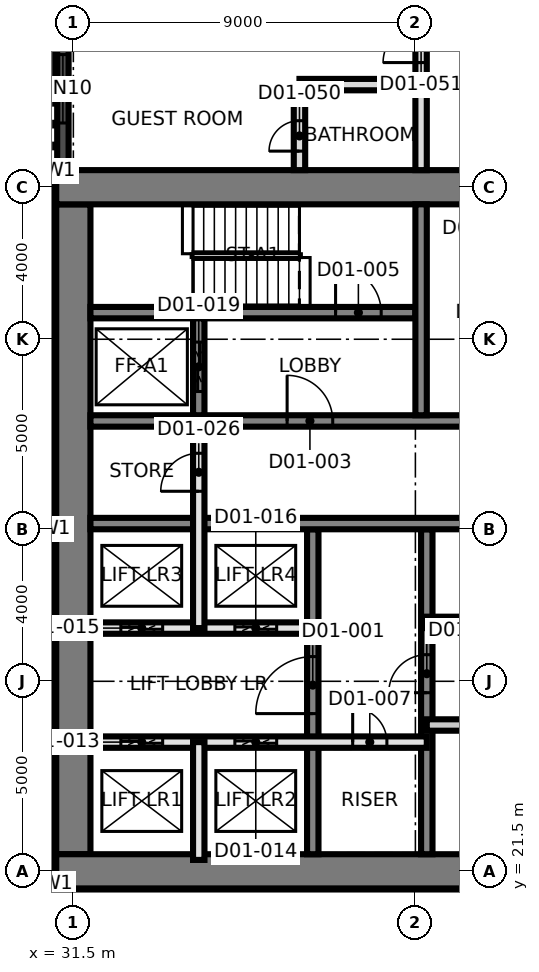
"""IFC4 building model, lengths in metres.
Left out: names, types, materials, properties, quantities, classifications, styles, units other than length and angle.
Written with IfcOpenShell. Run it as: python <this file> out.ifc"""

import sys

from ifc_helpers import new_model, si_unit, direction, frame, frame_2d, origin, place, context, subcontext, project, spatial, rectangle, extrude, element, fill, save


model = new_model("IFC4")
c1 = context("Model", 3, precision=1e-05, world=origin(), true_north=direction((0.0, 1.0)))
c2 = subcontext(c1, "Body", "Model", "MODEL_VIEW")
j1 = project(units=[si_unit("LENGTHUNIT", "METRE"), si_unit("PLANEANGLEUNIT", "RADIAN")], contexts=[c1])
p1 = place(None, origin())
s1 = spatial("IfcSite", under=j1, at=p1, CompositionType="ELEMENT")
p2 = place(p1, origin())
s2 = spatial("IfcBuilding", under=s1, at=p2, CompositionType="ELEMENT")
p3 = place(p2, frame((0.0, 0.0, 33.5)))
s3 = spatial("IfcBuildingStorey", under=s2, at=p3, CompositionType="ELEMENT", Elevation=33.5)
p4 = place(p3, frame((31.5, 21.95, 0.0), z_axis=(0.0, 0.0, 1.0), x_axis=(0.0, 1.0, 0.0)))
e1 = element("IfcWall", 1, at=p4, inside=s3, PredefinedType="SHEAR", context=c2, shape_type="SweptSolid", body=[
    extrude(rectangle(XDim=17.1, YDim=0.9, at=frame_2d((8.55, 0.0))), origin(), (0.0, 0.0, 1.0), 3.7),
])
p5 = place(p3, frame((31.05, 21.5, 0.0), z_axis=(0.0, 0.0, 1.0), x_axis=(1.0, 0.0, 0.0)))
e2 = element("IfcWall", 2, at=p5, inside=s3, PredefinedType="SHEAR", context=c2, shape_type="SweptSolid", body=[
    extrude(rectangle(XDim=27.0, YDim=0.9, at=frame_2d((13.5, 0.0))), origin(), (0.0, 0.0, 1.0), 3.7),
])
p6 = place(p3, frame((31.05, 39.5, 0.0), z_axis=(0.0, 0.0, 1.0), x_axis=(1.0, 0.0, 0.0)))
e3 = element("IfcWall", 3, at=p6, inside=s3, PredefinedType="SHEAR", context=c2, shape_type="SweptSolid", body=[
    extrude(rectangle(XDim=27.0, YDim=0.9, at=frame_2d((13.5, 0.0))), origin(), (0.0, 0.0, 1.0), 3.7),
])
p7 = place(p6, frame((10.65, 0.0, 0.0)))
e4 = element("IfcOpeningElement", 4, at=p7, cuts=e3, PredefinedType="OPENING", context=c2, shape_type="SweptSolid", body=[
    extrude(rectangle(XDim=1.2, YDim=2.1, at=frame_2d((0.6, 1.05))), frame((0.0, 0.46, 0.0), z_axis=(0.0, -1.0, 0.0), x_axis=(1.0, 0.0, 0.0)), (0.0, 0.0, 1.0), 0.92),
])
p8 = place(p3, frame((37.8, 21.95, 0.0), z_axis=(0.0, 0.0, 1.0), x_axis=(0.0, 1.0, 0.0)))
e5 = element("IfcWall", 5, at=p8, inside=s3, PredefinedType="SHEAR", context=c2, shape_type="SweptSolid", body=[
    extrude(rectangle(XDim=8.55, YDim=0.3, at=frame_2d((4.275, 0.0))), origin(), (0.0, 0.0, 1.0), 3.7),
])
p9 = place(p8, frame((3.7, 0.0, 0.0)))
e6 = element("IfcOpeningElement", 6, at=p9, cuts=e5, PredefinedType="OPENING", context=c2, shape_type="SweptSolid", body=[
    extrude(rectangle(XDim=1.5, YDim=2.1, at=frame_2d((0.75, 1.05))), frame((0.0, 0.16, 0.0), z_axis=(0.0, -1.0, 0.0), x_axis=(1.0, 0.0, 0.0)), (0.0, 0.0, 1.0), 0.32),
])
p10 = place(p3, frame((40.8, 21.95, 0.0), z_axis=(0.0, 0.0, 1.0), x_axis=(0.0, 1.0, 0.0)))
e7 = element("IfcWall", 7, at=p10, inside=s3, PredefinedType="SHEAR", context=c2, shape_type="SweptSolid", body=[
    extrude(rectangle(XDim=8.55, YDim=0.3, at=frame_2d((4.275, 0.0))), origin(), (0.0, 0.0, 1.0), 3.7),
])
p11 = place(p10, frame((4.25, 0.0, 0.0)))
e8 = element("IfcOpeningElement", 8, at=p11, cuts=e7, PredefinedType="OPENING", context=c2, shape_type="SweptSolid", body=[
    extrude(rectangle(XDim=1.0, YDim=2.1, at=frame_2d((0.5, 1.05))), frame((0.0, 0.16, 0.0), z_axis=(0.0, -1.0, 0.0), x_axis=(1.0, 0.0, 0.0)), (0.0, 0.0, 1.0), 0.32),
])
p12 = place(p3, frame((31.95, 30.65, 0.0), z_axis=(0.0, 0.0, 1.0), x_axis=(1.0, 0.0, 0.0)))
e9 = element("IfcWall", 9, at=p12, inside=s3, PredefinedType="SHEAR", context=c2, shape_type="SweptSolid", body=[
    extrude(rectangle(XDim=26.1, YDim=0.3, at=frame_2d((13.05, 0.0))), origin(), (0.0, 0.0, 1.0), 3.7),
])
p13 = place(p12, frame((24.55, 0.0, 0.0)))
e10 = element("IfcOpeningElement", 10, at=p13, cuts=e9, PredefinedType="OPENING", context=c2, shape_type="SweptSolid", body=[
    extrude(rectangle(XDim=1.0, YDim=2.1, at=frame_2d((0.5, 1.05))), frame((0.0, 0.16, 0.0), z_axis=(0.0, -1.0, 0.0), x_axis=(1.0, 0.0, 0.0)), (0.0, 0.0, 1.0), 0.32),
])
p14 = place(p12, frame((11.35, 0.0, 0.0)))
e11 = element("IfcOpeningElement", 11, at=p14, cuts=e9, PredefinedType="OPENING", context=c2, shape_type="SweptSolid", body=[
    extrude(rectangle(XDim=1.0, YDim=2.1, at=frame_2d((0.5, 1.05))), frame((0.0, 0.16, 0.0), z_axis=(0.0, -1.0, 0.0), x_axis=(1.0, 0.0, 0.0)), (0.0, 0.0, 1.0), 0.32),
])
p15 = place(p3, frame((31.95, 33.35, 0.0), z_axis=(0.0, 0.0, 1.0), x_axis=(1.0, 0.0, 0.0)))
e12 = element("IfcWall", 12, at=p15, inside=s3, PredefinedType="SHEAR", context=c2, shape_type="SweptSolid", body=[
    extrude(rectangle(XDim=26.1, YDim=0.3, at=frame_2d((13.05, 0.0))), origin(), (0.0, 0.0, 1.0), 3.7),
])
p16 = place(p15, frame((13.7, 0.0, 0.0)))
e13 = element("IfcOpeningElement", 13, at=p16, cuts=e12, PredefinedType="OPENING", context=c2, shape_type="SweptSolid", body=[
    extrude(rectangle(XDim=1.4, YDim=2.1, at=frame_2d((0.7, 1.05))), frame((0.0, 0.16, 0.0), z_axis=(0.0, -1.0, 0.0), x_axis=(1.0, 0.0, 0.0)), (0.0, 0.0, 1.0), 0.32),
])
p17 = place(p15, frame((5.175, 0.0, 0.0)))
e14 = element("IfcOpeningElement", 14, at=p17, cuts=e12, PredefinedType="OPENING", context=c2, shape_type="SweptSolid", body=[
    extrude(rectangle(XDim=1.2, YDim=2.1, at=frame_2d((0.6, 1.05))), frame((0.0, 0.16, 0.0), z_axis=(0.0, -1.0, 0.0), x_axis=(1.0, 0.0, 0.0)), (0.0, 0.0, 1.0), 0.32),
])
p18 = place(p15, frame((19.725, 0.0, 0.0)))
e15 = element("IfcOpeningElement", 15, at=p18, cuts=e12, PredefinedType="OPENING", context=c2, shape_type="SweptSolid", body=[
    extrude(rectangle(XDim=1.2, YDim=2.1, at=frame_2d((0.6, 1.05))), frame((0.0, 0.16, 0.0), z_axis=(0.0, -1.0, 0.0), x_axis=(1.0, 0.0, 0.0)), (0.0, 0.0, 1.0), 0.32),
])
p19 = place(p3, frame((31.95, 36.2, 0.0), z_axis=(0.0, 0.0, 1.0), x_axis=(1.0, 0.0, 0.0)))
e16 = element("IfcWall", 16, at=p19, inside=s3, PredefinedType="SHEAR", context=c2, shape_type="SweptSolid", body=[
    extrude(rectangle(XDim=8.55, YDim=0.3, at=frame_2d((4.275, 0.0))), origin(), (0.0, 0.0, 1.0), 3.7),
])
p20 = place(p19, frame((6.45, 0.0, 0.0)))
e17 = element("IfcOpeningElement", 17, at=p20, cuts=e16, PredefinedType="OPENING", context=c2, shape_type="SweptSolid", body=[
    extrude(rectangle(XDim=1.2, YDim=2.1, at=frame_2d((0.6, 1.05))), frame((0.0, 0.16, 0.0), z_axis=(0.0, -1.0, 0.0), x_axis=(1.0, 0.0, 0.0)), (0.0, 0.0, 1.0), 0.32),
])
p21 = place(p3, frame((40.65, 33.5, 0.0), z_axis=(0.0, 0.0, 1.0), x_axis=(0.0, 1.0, 0.0)))
e18 = element("IfcWall", 18, at=p21, inside=s3, PredefinedType="SHEAR", context=c2, shape_type="SweptSolid", body=[
    extrude(rectangle(XDim=5.55, YDim=0.3, at=frame_2d((2.775, 0.0))), origin(), (0.0, 0.0, 1.0), 3.7),
])
p22 = place(p3, frame((34.8, 33.5, 0.0), z_axis=(0.0, 0.0, 1.0), x_axis=(0.0, 1.0, 0.0)))
e19 = element("IfcWall", 19, at=p22, inside=s3, PredefinedType="SHEAR", context=c2, shape_type="SweptSolid", body=[
    extrude(rectangle(XDim=2.55, YDim=0.3, at=frame_2d((1.275, 0.0))), origin(), (0.0, 0.0, 1.0), 3.7),
])
p23 = place(p22, frame((0.625, 0.0, 0.0)))
e20 = element("IfcOpeningElement", 20, at=p23, cuts=e19, PredefinedType="OPENING", context=c2, shape_type="SweptSolid", body=[
    extrude(rectangle(XDim=1.3, YDim=2.4, at=frame_2d((0.65, 1.2))), frame((0.0, 0.16, 0.0), z_axis=(0.0, -1.0, 0.0), x_axis=(1.0, 0.0, 0.0)), (0.0, 0.0, 1.0), 0.32),
])
p24 = place(p3, frame((31.225, 49.2, 0.0), z_axis=(0.0, 0.0, 1.0), x_axis=(0.0, -1.0, 0.0)))
e21 = element("IfcWall", 21, at=p24, inside=s3, PredefinedType="SOLIDWALL", context=c2, shape_type="SweptSolid", body=[
    extrude(rectangle(XDim=9.02, YDim=0.3, at=frame_2d((4.51, 0.0))), origin(), (0.0, 0.0, 1.0), 3.4),
])
p25 = place(p24, frame((2.35, 0.0, 0.9)))
e22 = element("IfcOpeningElement", 22, at=p25, cuts=e21, PredefinedType="OPENING", context=c2, shape_type="SweptSolid", body=[
    extrude(rectangle(XDim=1.2, YDim=1.5, at=frame_2d((0.6, 0.75))), frame((0.0, 0.16, 0.0), z_axis=(0.0, -1.0, 0.0), x_axis=(1.0, 0.0, 0.0)), (0.0, 0.0, 1.0), 0.32),
])
p26 = place(p24, frame((6.21, 0.0, 0.3)))
e23 = element("IfcOpeningElement", 23, at=p26, cuts=e21, PredefinedType="OPENING", context=c2, shape_type="SweptSolid", body=[
    extrude(rectangle(XDim=1.8, YDim=2.4, at=frame_2d((0.9, 1.2))), frame((0.0, 0.16, 0.0), z_axis=(0.0, -1.0, 0.0), x_axis=(1.0, 0.0, 0.0)), (0.0, 0.0, 1.0), 0.32),
])
p27 = place(p3, frame((30.85, 39.674, 0.0), z_axis=(0.0, 0.0, 1.0), x_axis=(0.0, -1.0, 0.0)))
e24 = element("IfcWall", 24, at=p27, inside=s3, PredefinedType="SOLIDWALL", context=c2, shape_type="SweptSolid", body=[
    extrude(rectangle(XDim=18.314, YDim=0.3, at=frame_2d((9.157, 0.0))), origin(), (0.0, 0.0, 1.0), 3.4),
])
for number, where, z_axis, x_axis in (
    (25, (30.861, 21.302, 0.0), (0.0, 0.0, 1.0), (0.383, -0.924, 0.0)),
    (26, (31.048, 20.967, 0.0), (0.0, 0.0, 1.0), (0.924, -0.383, 0.0)),
):
    element("IfcWall", number, at=place(p3, frame(where, z_axis=z_axis, x_axis=x_axis)), inside=s3, PredefinedType="SOLIDWALL", context=c2, shape_type="SweptSolid", body=[
        extrude(rectangle(XDim=0.275, YDim=0.3, at=frame_2d((0.138, 0.0))), origin(), (0.0, 0.0, 1.0), 3.4),
    ])
p28 = place(p3, frame((31.36, 20.85, 0.0), z_axis=(0.0, 0.0, 1.0), x_axis=(1.0, 0.0, 0.0)))
e27 = element("IfcWall", 27, at=p28, inside=s3, PredefinedType="SOLIDWALL", context=c2, shape_type="SweptSolid", body=[
    extrude(rectangle(XDim=27.281, YDim=0.3, at=frame_2d((13.64, 0.0))), origin(), (0.0, 0.0, 1.0), 3.4),
])
p29 = place(p3, frame((31.8, 24.9, 0.0), z_axis=(0.0, 0.0, 1.0), x_axis=(1.0, 0.0, 0.0)))
e28 = element("IfcWall", 28, at=p29, inside=s3, PredefinedType="SOLIDWALL", context=c2, shape_type="SweptSolid", body=[
    extrude(rectangle(XDim=9.0, YDim=0.3, at=frame_2d((4.5, 0.0))), origin(), (0.0, 0.0, 1.0), 3.4),
])
p30 = place(p29, frame((7.05, 0.0, 0.0)))
e29 = element("IfcOpeningElement", 29, at=p30, cuts=e28, PredefinedType="OPENING", context=c2, shape_type="SweptSolid", body=[
    extrude(rectangle(XDim=0.9, YDim=2.1, at=frame_2d((0.45, 1.05))), frame((0.0, 0.16, 0.0), z_axis=(0.0, -1.0, 0.0), x_axis=(1.0, 0.0, 0.0)), (0.0, 0.0, 1.0), 0.32),
])
p31 = place(p29, frame((0.95, 0.0, 0.0)))
e30 = element("IfcOpeningElement", 30, at=p31, cuts=e28, PredefinedType="OPENING", context=c2, shape_type="SweptSolid", body=[
    extrude(rectangle(XDim=1.1, YDim=2.4, at=frame_2d((0.55, 1.2))), frame((0.0, 0.16, 0.0), z_axis=(0.0, -1.0, 0.0), x_axis=(1.0, 0.0, 0.0)), (0.0, 0.0, 1.0), 0.32),
])
p32 = place(p29, frame((3.95, 0.0, 0.0)))
e31 = element("IfcOpeningElement", 31, at=p32, cuts=e28, PredefinedType="OPENING", context=c2, shape_type="SweptSolid", body=[
    extrude(rectangle(XDim=1.1, YDim=2.4, at=frame_2d((0.55, 1.2))), frame((0.0, 0.16, 0.0), z_axis=(0.0, -1.0, 0.0), x_axis=(1.0, 0.0, 0.0)), (0.0, 0.0, 1.0), 0.32),
])
p33 = place(p3, frame((40.8, 25.35, 0.0), z_axis=(0.0, 0.0, 1.0), x_axis=(1.0, 0.0, 0.0)))
e32 = element("IfcWall", 32, at=p33, inside=s3, PredefinedType="PARTITIONING", context=c2, shape_type="SweptSolid", body=[
    extrude(rectangle(XDim=6.0, YDim=0.3, at=frame_2d((3.0, 0.0))), origin(), (0.0, 0.0, 1.0), 3.4),
])
p34 = place(p33, frame((2.5, 0.0, 0.0)))
e33 = element("IfcOpeningElement", 33, at=p34, cuts=e32, PredefinedType="OPENING", context=c2, shape_type="SweptSolid", body=[
    extrude(rectangle(XDim=1.0, YDim=2.1, at=frame_2d((0.5, 1.05))), frame((0.0, 0.16, 0.0), z_axis=(0.0, -1.0, 0.0), x_axis=(1.0, 0.0, 0.0)), (0.0, 0.0, 1.0), 0.32),
])
p35 = place(p3, frame((31.8, 27.9, 0.0), z_axis=(0.0, 0.0, 1.0), x_axis=(1.0, 0.0, 0.0)))
e34 = element("IfcWall", 34, at=p35, inside=s3, PredefinedType="SOLIDWALL", context=c2, shape_type="SweptSolid", body=[
    extrude(rectangle(XDim=6.0, YDim=0.3, at=frame_2d((3.0, 0.0))), origin(), (0.0, 0.0, 1.0), 3.4),
])
p36 = place(p35, frame((0.95, 0.0, 0.0)))
e35 = element("IfcOpeningElement", 35, at=p36, cuts=e34, PredefinedType="OPENING", context=c2, shape_type="SweptSolid", body=[
    extrude(rectangle(XDim=1.1, YDim=2.4, at=frame_2d((0.55, 1.2))), frame((0.0, 0.16, 0.0), z_axis=(0.0, -1.0, 0.0), x_axis=(1.0, 0.0, 0.0)), (0.0, 0.0, 1.0), 0.32),
])
p37 = place(p35, frame((3.95, 0.0, 0.0)))
e36 = element("IfcOpeningElement", 36, at=p37, cuts=e34, PredefinedType="OPENING", context=c2, shape_type="SweptSolid", body=[
    extrude(rectangle(XDim=1.1, YDim=2.4, at=frame_2d((0.55, 1.2))), frame((0.0, 0.16, 0.0), z_axis=(0.0, -1.0, 0.0), x_axis=(1.0, 0.0, 0.0)), (0.0, 0.0, 1.0), 0.32),
])
p38 = place(p3, frame((40.8, 28.05, 0.0), z_axis=(0.0, 0.0, 1.0), x_axis=(1.0, 0.0, 0.0)))
e37 = element("IfcWall", 37, at=p38, inside=s3, PredefinedType="PARTITIONING", context=c2, shape_type="SweptSolid", body=[
    extrude(rectangle(XDim=6.0, YDim=0.3, at=frame_2d((3.0, 0.0))), origin(), (0.0, 0.0, 1.0), 3.4),
])
p39 = place(p3, frame((34.8, 21.8, 0.0), z_axis=(0.0, 0.0, 1.0), x_axis=(0.0, 1.0, 0.0)))
e38 = element("IfcWall", 38, at=p39, inside=s3, PredefinedType="SOLIDWALL", context=c2, shape_type="SweptSolid", body=[
    extrude(rectangle(XDim=3.1, YDim=0.3, at=frame_2d((1.55, 0.0))), origin(), (0.0, 0.0, 1.0), 3.4),
])
p40 = place(p3, frame((34.8, 27.9, 0.0), z_axis=(0.0, 0.0, 1.0), x_axis=(0.0, 1.0, 0.0)))
e39 = element("IfcWall", 39, at=p40, inside=s3, PredefinedType="SOLIDWALL", context=c2, shape_type="SweptSolid", body=[
    extrude(rectangle(XDim=5.45, YDim=0.3, at=frame_2d((2.725, 0.0))), origin(), (0.0, 0.0, 1.0), 3.4),
])
p41 = place(p40, frame((3.6, 0.0, 0.0)))
e40 = element("IfcOpeningElement", 40, at=p41, cuts=e39, PredefinedType="OPENING", context=c2, shape_type="SweptSolid", body=[
    extrude(rectangle(XDim=1.0, YDim=2.1, at=frame_2d((0.5, 1.05))), frame((0.0, 0.16, 0.0), z_axis=(0.0, -1.0, 0.0), x_axis=(1.0, 0.0, 0.0)), (0.0, 0.0, 1.0), 0.32),
])
p42 = place(p3, frame((37.45, 42.2, 0.0), z_axis=(0.0, 0.0, 1.0), x_axis=(1.0, 0.0, 0.0)))
e41 = element("IfcWall", 41, at=p42, inside=s3, PredefinedType="PARTITIONING", context=c2, shape_type="SweptSolid", body=[
    extrude(rectangle(XDim=3.2, YDim=0.3, at=frame_2d((1.6, 0.0))), origin(), (0.0, 0.0, 1.0), 3.4),
])
p43 = place(p3, frame((37.45, 39.95, 0.0), z_axis=(0.0, 0.0, 1.0), x_axis=(0.0, 1.0, 0.0)))
e42 = element("IfcWall", 42, at=p43, inside=s3, PredefinedType="PARTITIONING", context=c2, shape_type="SweptSolid", body=[
    extrude(rectangle(XDim=2.25, YDim=0.3, at=frame_2d((1.125, 0.0))), origin(), (0.0, 0.0, 1.0), 3.4),
])
p44 = place(p43, frame((0.5, 0.0, 0.0)))
e43 = element("IfcOpeningElement", 43, at=p44, cuts=e42, PredefinedType="OPENING", context=c2, shape_type="SweptSolid", body=[
    extrude(rectangle(XDim=0.8, YDim=2.1, at=frame_2d((0.4, 1.05))), frame((0.0, 0.16, 0.0), z_axis=(0.0, -1.0, 0.0), x_axis=(1.0, 0.0, 0.0)), (0.0, 0.0, 1.0), 0.32),
])
p45 = place(p3, frame((40.65, 39.95, 0.0), z_axis=(0.0, 0.0, 1.0), x_axis=(0.0, 1.0, 0.0)))
e44 = element("IfcWall", 44, at=p45, inside=s3, PredefinedType="PARTITIONING", context=c2, shape_type="SweptSolid", body=[
    extrude(rectangle(XDim=35.625, YDim=0.3, at=frame_2d((17.812, 0.0))), origin(), (0.0, 0.0, 1.0), 3.4),
])
p46 = place(p45, frame((2.83, 0.0, 0.0)))
e45 = element("IfcOpeningElement", 45, at=p46, cuts=e44, PredefinedType="OPENING", context=c2, shape_type="SweptSolid", body=[
    extrude(rectangle(XDim=1.0, YDim=2.1, at=frame_2d((0.5, 1.05))), frame((0.0, 0.16, 0.0), z_axis=(0.0, -1.0, 0.0), x_axis=(1.0, 0.0, 0.0)), (0.0, 0.0, 1.0), 0.32),
])
p47 = place(p45, frame((4.63, 0.0, 0.0)))
e46 = element("IfcOpeningElement", 46, at=p47, cuts=e44, PredefinedType="OPENING", context=c2, shape_type="SweptSolid", body=[
    extrude(rectangle(XDim=1.0, YDim=2.1, at=frame_2d((0.5, 1.05))), frame((0.0, 0.16, 0.0), z_axis=(0.0, -1.0, 0.0), x_axis=(1.0, 0.0, 0.0)), (0.0, 0.0, 1.0), 0.32),
])
p48 = place(p45, frame((11.47, 0.0, 0.0)))
e47 = element("IfcOpeningElement", 47, at=p48, cuts=e44, PredefinedType="OPENING", context=c2, shape_type="SweptSolid", body=[
    extrude(rectangle(XDim=1.0, YDim=2.1, at=frame_2d((0.5, 1.05))), frame((0.0, 0.16, 0.0), z_axis=(0.0, -1.0, 0.0), x_axis=(1.0, 0.0, 0.0)), (0.0, 0.0, 1.0), 0.32),
])
p49 = place(p45, frame((13.27, 0.0, 0.0)))
e48 = element("IfcOpeningElement", 48, at=p49, cuts=e44, PredefinedType="OPENING", context=c2, shape_type="SweptSolid", body=[
    extrude(rectangle(XDim=1.0, YDim=2.1, at=frame_2d((0.5, 1.05))), frame((0.0, 0.16, 0.0), z_axis=(0.0, -1.0, 0.0), x_axis=(1.0, 0.0, 0.0)), (0.0, 0.0, 1.0), 0.32),
])
p50 = place(p45, frame((21.05, 0.0, 0.0)))
e49 = element("IfcOpeningElement", 49, at=p50, cuts=e44, PredefinedType="OPENING", context=c2, shape_type="SweptSolid", body=[
    extrude(rectangle(XDim=1.0, YDim=2.4, at=frame_2d((0.5, 1.2))), frame((0.0, 0.16, 0.0), z_axis=(0.0, -1.0, 0.0), x_axis=(1.0, 0.0, 0.0)), (0.0, 0.0, 1.0), 0.32),
])
p51 = place(p26, origin())
e50 = element("IfcWindow", 50, at=p51, inside=s3, PartitioningType="SINGLE_PANEL", PredefinedType="WINDOW", context=c2, shape_type="SweptSolid", body=[
    extrude(rectangle(XDim=1.8, YDim=2.4, at=frame_2d((0.9, 1.2))), frame((0.0, 0.03, 0.0), z_axis=(0.0, -1.0, 0.0), x_axis=(1.0, 0.0, 0.0)), (0.0, 0.0, 1.0), 0.06),
])
fill(e23, e50)
p52 = place(p9, origin())
e51 = element("IfcDoor", 51, at=p52, inside=s3, OperationType="SINGLE_SWING_LEFT", PredefinedType="DOOR", context=c2, shape_type="SweptSolid", body=[
    extrude(rectangle(XDim=1.5, YDim=2.1, at=frame_2d((0.75, 1.05))), frame((0.0, 0.025, 0.0), z_axis=(0.0, -1.0, 0.0), x_axis=(1.0, 0.0, 0.0)), (0.0, 0.0, 1.0), 0.05),
])
fill(e6, e51)
p53 = place(p17, origin())
e52 = element("IfcDoor", 52, at=p53, inside=s3, OperationType="SINGLE_SWING_LEFT", PredefinedType="DOOR", context=c2, shape_type="SweptSolid", body=[
    extrude(rectangle(XDim=1.2, YDim=2.1, at=frame_2d((0.6, 1.05))), frame((0.0, 0.025, 0.0), z_axis=(0.0, -1.0, 0.0), x_axis=(1.0, 0.0, 0.0)), (0.0, 0.0, 1.0), 0.05),
])
fill(e14, e52)
p54 = place(p20, origin())
e53 = element("IfcDoor", 53, at=p54, inside=s3, OperationType="SINGLE_SWING_RIGHT", PredefinedType="DOOR", context=c2, shape_type="SweptSolid", body=[
    extrude(rectangle(XDim=1.2, YDim=2.1, at=frame_2d((0.6, 1.05))), frame((0.0, 0.025, 0.0), z_axis=(0.0, -1.0, 0.0), x_axis=(1.0, 0.0, 0.0)), (0.0, 0.0, 1.0), 0.05),
])
fill(e17, e53)
p55 = place(p30, origin())
e54 = element("IfcDoor", 54, at=p55, inside=s3, OperationType="SINGLE_SWING_LEFT", PredefinedType="DOOR", context=c2, shape_type="SweptSolid", body=[
    extrude(rectangle(XDim=0.9, YDim=2.1, at=frame_2d((0.45, 1.05))), frame((0.0, 0.025, 0.0), z_axis=(0.0, -1.0, 0.0), x_axis=(1.0, 0.0, 0.0)), (0.0, 0.0, 1.0), 0.05),
])
fill(e29, e54)
p56 = place(p31, origin())
e55 = element("IfcDoor", 55, at=p56, inside=s3, OperationType="SLIDING_TO_LEFT", PredefinedType="DOOR", context=c2, shape_type="SweptSolid", body=[
    extrude(rectangle(XDim=1.1, YDim=2.4, at=frame_2d((0.55, 1.2))), frame((0.0, 0.025, 0.0), z_axis=(0.0, -1.0, 0.0), x_axis=(1.0, 0.0, 0.0)), (0.0, 0.0, 1.0), 0.05),
])
fill(e30, e55)
p57 = place(p32, origin())
e56 = element("IfcDoor", 56, at=p57, inside=s3, OperationType="SLIDING_TO_LEFT", PredefinedType="DOOR", context=c2, shape_type="SweptSolid", body=[
    extrude(rectangle(XDim=1.1, YDim=2.4, at=frame_2d((0.55, 1.2))), frame((0.0, 0.025, 0.0), z_axis=(0.0, -1.0, 0.0), x_axis=(1.0, 0.0, 0.0)), (0.0, 0.0, 1.0), 0.05),
])
fill(e31, e56)
p58 = place(p36, origin())
e57 = element("IfcDoor", 57, at=p58, inside=s3, OperationType="SLIDING_TO_LEFT", PredefinedType="DOOR", context=c2, shape_type="SweptSolid", body=[
    extrude(rectangle(XDim=1.1, YDim=2.4, at=frame_2d((0.55, 1.2))), frame((0.0, 0.025, 0.0), z_axis=(0.0, -1.0, 0.0), x_axis=(1.0, 0.0, 0.0)), (0.0, 0.0, 1.0), 0.05),
])
fill(e35, e57)
p59 = place(p37, origin())
e58 = element("IfcDoor", 58, at=p59, inside=s3, OperationType="SLIDING_TO_LEFT", PredefinedType="DOOR", context=c2, shape_type="SweptSolid", body=[
    extrude(rectangle(XDim=1.1, YDim=2.4, at=frame_2d((0.55, 1.2))), frame((0.0, 0.025, 0.0), z_axis=(0.0, -1.0, 0.0), x_axis=(1.0, 0.0, 0.0)), (0.0, 0.0, 1.0), 0.05),
])
fill(e36, e58)
p60 = place(p23, origin())
e59 = element("IfcDoor", 59, at=p60, inside=s3, OperationType="SLIDING_TO_LEFT", PredefinedType="DOOR", context=c2, shape_type="SweptSolid", body=[
    extrude(rectangle(XDim=1.3, YDim=2.4, at=frame_2d((0.65, 1.2))), frame((0.0, 0.025, 0.0), z_axis=(0.0, -1.0, 0.0), x_axis=(1.0, 0.0, 0.0)), (0.0, 0.0, 1.0), 0.05),
])
fill(e20, e59)
p61 = place(p11, origin())
e60 = element("IfcDoor", 60, at=p61, inside=s3, OperationType="SINGLE_SWING_RIGHT", PredefinedType="DOOR", context=c2, shape_type="SweptSolid", body=[
    extrude(rectangle(XDim=1.0, YDim=2.1, at=frame_2d((0.5, 1.05))), frame((0.0, 0.025, 0.0), z_axis=(0.0, -1.0, 0.0), x_axis=(1.0, 0.0, 0.0)), (0.0, 0.0, 1.0), 0.05),
])
fill(e8, e60)
p62 = place(p41, origin())
e61 = element("IfcDoor", 61, at=p62, inside=s3, OperationType="SINGLE_SWING_RIGHT", PredefinedType="DOOR", context=c2, shape_type="SweptSolid", body=[
    extrude(rectangle(XDim=1.0, YDim=2.1, at=frame_2d((0.5, 1.05))), frame((0.0, 0.025, 0.0), z_axis=(0.0, -1.0, 0.0), x_axis=(1.0, 0.0, 0.0)), (0.0, 0.0, 1.0), 0.05),
])
fill(e40, e61)
p63 = place(p44, origin())
e62 = element("IfcDoor", 62, at=p63, inside=s3, OperationType="SINGLE_SWING_LEFT", PredefinedType="DOOR", context=c2, shape_type="SweptSolid", body=[
    extrude(rectangle(XDim=0.8, YDim=2.1, at=frame_2d((0.4, 1.05))), frame((0.0, 0.025, 0.0), z_axis=(0.0, -1.0, 0.0), x_axis=(1.0, 0.0, 0.0)), (0.0, 0.0, 1.0), 0.05),
])
fill(e43, e62)
p64 = place(p46, origin())
e63 = element("IfcDoor", 63, at=p64, inside=s3, OperationType="SINGLE_SWING_RIGHT", PredefinedType="DOOR", context=c2, shape_type="SweptSolid", body=[
    extrude(rectangle(XDim=1.0, YDim=2.1, at=frame_2d((0.5, 1.05))), frame((0.0, 0.025, 0.0), z_axis=(0.0, -1.0, 0.0), x_axis=(1.0, 0.0, 0.0)), (0.0, 0.0, 1.0), 0.05),
])
fill(e45, e63)
save(model, sys.argv[1])
